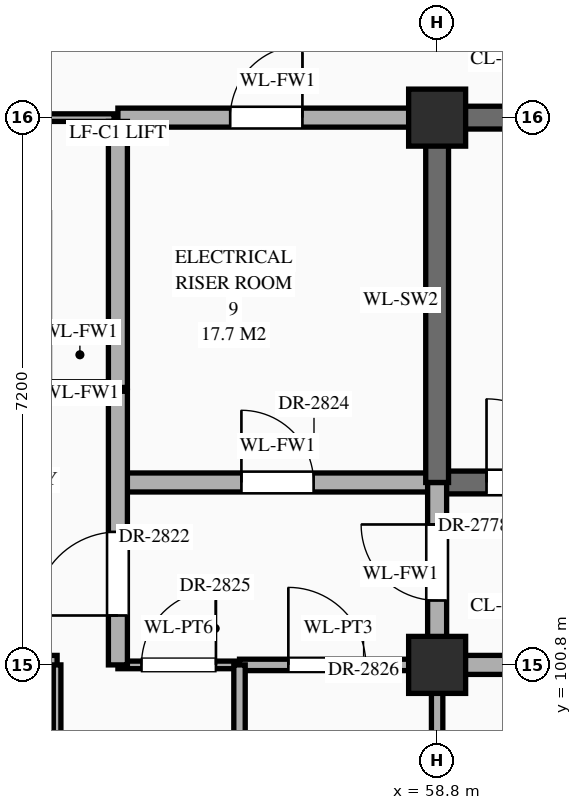
"""IFC4 building model, lengths in metres.
Left out: names, types, materials, properties, quantities, classifications, styles, units other than length and angle.
Written with IfcOpenShell. Run it as: python <this file> out.ifc"""

import sys

from ifc_helpers import new_model, si_unit, direction, frame, frame_2d, origin, origin_2d, place, context, subcontext, project, spatial, rectangle, extrude, element, fill, save


model = new_model("IFC4")
c1 = context("Model", 3, precision=1e-05, world=origin(), true_north=direction((0.0, 1.0)))
c2 = subcontext(c1, "Body", "Model", "MODEL_VIEW")
j1 = project(units=[si_unit("LENGTHUNIT", "METRE"), si_unit("PLANEANGLEUNIT", "RADIAN")], contexts=[c1])
p1 = place(None, origin())
s1 = spatial("IfcSite", under=j1, at=p1, CompositionType="ELEMENT")
p2 = place(p1, origin())
s2 = spatial("IfcBuilding", under=s1, at=p2, CompositionType="ELEMENT")
p3 = place(p2, frame((0.0, 0.0, 43.5)))
s3 = spatial("IfcBuildingStorey", under=s2, at=p3, CompositionType="ELEMENT", Elevation=43.5)
for number, where, z_axis, x_axis in (
    (1, (58.8, 100.8, 0.0), (0.0, 0.0, 1.0), (1.0, 0.0, 0.0)),
    (2, (58.8, 108.0, 0.0), (0.0, 0.0, 1.0), (1.0, 0.0, 0.0)),
):
    element("IfcColumn", number, at=place(p3, frame(where, z_axis=z_axis, x_axis=x_axis)), inside=s3, PredefinedType="COLUMN", context=c2, shape_type="SweptSolid", body=[
        extrude(rectangle(XDim=0.75, YDim=0.75, at=origin_2d()), origin(), (0.0, 0.0, 1.0), 4.2),
    ])
p4 = place(p3, frame((50.4, 100.8, 0.0), z_axis=(0.0, 0.0, 1.0), x_axis=(1.0, 0.0, 0.0)))
e3 = element("IfcWall", 3, at=p4, inside=s3, PredefinedType="STANDARD", context=c2, shape_type="SweptSolid", body=[
    extrude(rectangle(XDim=3.4, YDim=0.25, at=frame_2d((1.7, 0.0))), origin(), (0.0, 0.0, 1.0), 3.1),
])
p5 = place(p4, frame((1.347, 0.0, 0.0)))
e4 = element("IfcOpeningElement", 4, at=p5, cuts=e3, PredefinedType="OPENING", context=c2, shape_type="SweptSolid", body=[
    extrude(rectangle(XDim=1.0, YDim=2.2, at=frame_2d((0.5, 1.1))), frame((0.0, 0.137, 0.0), z_axis=(0.0, -1.0, 0.0), x_axis=(1.0, 0.0, 0.0)), (0.0, 0.0, 1.0), 0.274),
])
p6 = place(p3, frame((54.6, 100.8, 0.0), z_axis=(0.0, 0.0, 1.0), x_axis=(1.0, 0.0, 0.0)))
e5 = element("IfcWall", 5, at=p6, inside=s3, PredefinedType="STANDARD", context=c2, shape_type="SweptSolid", body=[
    extrude(rectangle(XDim=1.6, YDim=0.1, at=frame_2d((0.8, 0.0))), origin(), (0.0, 0.0, 1.0), 3.1),
])
p7 = place(p6, frame((0.31, 0.0, 0.0)))
e6 = element("IfcOpeningElement", 6, at=p7, cuts=e5, PredefinedType="OPENING", context=c2, shape_type="SweptSolid", body=[
    extrude(rectangle(XDim=0.98, YDim=2.35, at=frame_2d((0.49, 1.175))), frame((0.0, 0.062, 0.0), z_axis=(0.0, -1.0, 0.0), x_axis=(1.0, 0.0, 0.0)), (0.0, 0.0, 1.0), 0.124),
])
p8 = place(p3, frame((56.2, 100.8, 0.0), z_axis=(0.0, 0.0, 1.0), x_axis=(1.0, 0.0, 0.0)))
e7 = element("IfcWall", 7, at=p8, inside=s3, PredefinedType="STANDARD", context=c2, shape_type="SweptSolid", body=[
    extrude(rectangle(XDim=2.6, YDim=0.15, at=frame_2d((1.3, 0.0))), origin(), (0.0, 0.0, 1.0), 3.1),
])
p9 = place(p8, frame((0.643, 0.0, 0.0)))
e8 = element("IfcOpeningElement", 8, at=p9, cuts=e7, PredefinedType="OPENING", context=c2, shape_type="SweptSolid", body=[
    extrude(rectangle(XDim=1.02, YDim=2.4, at=frame_2d((0.51, 1.2))), frame((0.0, 0.087, 0.0), z_axis=(0.0, -1.0, 0.0), x_axis=(1.0, 0.0, 0.0)), (0.0, 0.0, 1.0), 0.174),
])
p10 = place(p3, frame((58.8, 100.8, 0.0), z_axis=(0.0, 0.0, 1.0), x_axis=(1.0, 0.0, 0.0)))
e9 = element("IfcWall", 9, at=p10, inside=s3, PredefinedType="STANDARD", context=c2, shape_type="SweptSolid", body=[
    extrude(rectangle(XDim=12.6, YDim=0.25, at=frame_2d((6.3, 0.0))), origin(), (0.0, 0.0, 1.0), 3.1),
])
p11 = place(p10, frame((3.725, 0.0, 0.0)))
e10 = element("IfcOpeningElement", 10, at=p11, cuts=e9, PredefinedType="OPENING", context=c2, shape_type="SweptSolid", body=[
    extrude(rectangle(XDim=0.95, YDim=2.15, at=frame_2d((0.475, 1.075))), frame((0.0, 0.137, 0.0), z_axis=(0.0, -1.0, 0.0), x_axis=(1.0, 0.0, 0.0)), (0.0, 0.0, 1.0), 0.274),
])
p12 = place(p3, frame((54.6, 103.2, 0.0), z_axis=(0.0, 0.0, 1.0), x_axis=(1.0, 0.0, 0.0)))
e11 = element("IfcWall", 11, at=p12, inside=s3, PredefinedType="STANDARD", context=c2, shape_type="SweptSolid", body=[
    extrude(rectangle(XDim=4.2, YDim=0.25, at=frame_2d((2.1, 0.0))), origin(), (0.0, 0.0, 1.0), 3.95),
])
p13 = place(p12, frame((1.625, 0.0, 0.0)))
e12 = element("IfcOpeningElement", 12, at=p13, cuts=e11, PredefinedType="OPENING", context=c2, shape_type="SweptSolid", body=[
    extrude(rectangle(XDim=0.95, YDim=2.15, at=frame_2d((0.475, 1.075))), frame((0.0, 0.137, 0.0), z_axis=(0.0, -1.0, 0.0), x_axis=(1.0, 0.0, 0.0)), (0.0, 0.0, 1.0), 0.274),
])
p14 = place(p3, frame((58.8, 103.2, 0.0), z_axis=(0.0, 0.0, 1.0), x_axis=(1.0, 0.0, 0.0)))
e13 = element("IfcWall", 13, at=p14, inside=s3, PredefinedType="SHEAR", context=c2, shape_type="SweptSolid", body=[
    extrude(rectangle(XDim=8.4, YDim=0.3, at=frame_2d((4.2, 0.0))), origin(), (0.0, 0.0, 1.0), 3.95),
])
p15 = place(p14, frame((0.65, 0.0, 0.0)))
e14 = element("IfcOpeningElement", 14, at=p15, cuts=e13, PredefinedType="OPENING", context=c2, shape_type="SweptSolid", body=[
    extrude(rectangle(XDim=1.1, YDim=2.2, at=frame_2d((0.55, 1.1))), frame((0.0, 0.162, 0.0), z_axis=(0.0, -1.0, 0.0), x_axis=(1.0, 0.0, 0.0)), (0.0, 0.0, 1.0), 0.324),
])
p16 = place(p3, frame((53.65, 104.4, 0.0), z_axis=(0.0, 0.0, 1.0), x_axis=(1.0, 0.0, 0.0)))
e15 = element("IfcWall", 15, at=p16, inside=s3, PredefinedType="STANDARD", context=c2, shape_type="SweptSolid", body=[
    extrude(rectangle(XDim=0.9, YDim=0.25, at=frame_2d((0.45, 0.0))), origin(), (0.0, 0.0, 1.0), 3.95),
])
p17 = place(p3, frame((50.45, 108.0, 0.0), z_axis=(0.0, 0.0, 1.0), x_axis=(1.0, 0.0, 0.0)))
e16 = element("IfcWall", 16, at=p17, inside=s3, PredefinedType="STANDARD", context=c2, shape_type="SweptSolid", body=[
    extrude(rectangle(XDim=4.1, YDim=0.1, at=frame_2d((2.05, 0.0))), origin(), (0.0, 0.0, 1.0), 3.1),
])
p18 = place(p3, frame((54.6, 108.0, 0.0), z_axis=(0.0, 0.0, 1.0), x_axis=(1.0, 0.0, 0.0)))
e17 = element("IfcWall", 17, at=p18, inside=s3, PredefinedType="STANDARD", context=c2, shape_type="SweptSolid", body=[
    extrude(rectangle(XDim=4.2, YDim=0.25, at=frame_2d((2.1, 0.0))), origin(), (0.0, 0.0, 1.0), 3.1),
])
p19 = place(p18, frame((1.478, 0.0, 0.0)))
e18 = element("IfcOpeningElement", 18, at=p19, cuts=e17, PredefinedType="OPENING", context=c2, shape_type="SweptSolid", body=[
    extrude(rectangle(XDim=0.95, YDim=2.15, at=frame_2d((0.475, 1.075))), frame((0.0, 0.137, 0.0), z_axis=(0.0, -1.0, 0.0), x_axis=(1.0, 0.0, 0.0)), (0.0, 0.0, 1.0), 0.274),
])
p20 = place(p3, frame((58.8, 108.0, 0.0), z_axis=(0.0, 0.0, 1.0), x_axis=(1.0, 0.0, 0.0)))
e19 = element("IfcWall", 19, at=p20, inside=s3, PredefinedType="SHEAR", context=c2, shape_type="SweptSolid", body=[
    extrude(rectangle(XDim=8.4, YDim=0.3, at=frame_2d((4.2, 0.0))), origin(), (0.0, 0.0, 1.0), 3.95),
])
p21 = place(p3, frame((53.8, 96.0, 0.0), z_axis=(0.0, 0.0, 1.0), x_axis=(0.0, 1.0, 0.0)))
e20 = element("IfcWall", 20, at=p21, inside=s3, PredefinedType="STANDARD", context=c2, shape_type="SweptSolid", body=[
    extrude(rectangle(XDim=4.8, YDim=0.1, at=frame_2d((2.4, 0.0))), origin(), (0.0, 0.0, 1.0), 3.95),
])
p22 = place(p21, frame((1.9, 0.0, 0.0)))
e21 = element("IfcOpeningElement", 21, at=p22, cuts=e20, PredefinedType="OPENING", context=c2, shape_type="SweptSolid", body=[
    extrude(rectangle(XDim=1.0, YDim=2.25, at=frame_2d((0.5, 1.125))), frame((0.0, 0.062, 0.0), z_axis=(0.0, -1.0, 0.0), x_axis=(1.0, 0.0, 0.0)), (0.0, 0.0, 1.0), 0.124),
])
p23 = place(p3, frame((54.6, 100.8, 0.0), z_axis=(0.0, 0.0, 1.0), x_axis=(0.0, 1.0, 0.0)))
e22 = element("IfcWall", 22, at=p23, inside=s3, PredefinedType="STANDARD", context=c2, shape_type="SweptSolid", body=[
    extrude(rectangle(XDim=3.6, YDim=0.25, at=frame_2d((1.8, 0.0))), origin(), (0.0, 0.0, 1.0), 3.65),
])
p24 = place(p23, frame((0.65, 0.0, 0.0)))
e23 = element("IfcOpeningElement", 23, at=p24, cuts=e22, PredefinedType="OPENING", context=c2, shape_type="SweptSolid", body=[
    extrude(rectangle(XDim=1.1, YDim=2.2, at=frame_2d((0.55, 1.1))), frame((0.0, 0.137, 0.0), z_axis=(0.0, -1.0, 0.0), x_axis=(1.0, 0.0, 0.0)), (0.0, 0.0, 1.0), 0.274),
])
p25 = place(p3, frame((54.6, 104.45, 0.0), z_axis=(0.0, 0.0, 1.0), x_axis=(0.0, 1.0, 0.0)))
e24 = element("IfcWall", 24, at=p25, inside=s3, PredefinedType="STANDARD", context=c2, shape_type="SweptSolid", body=[
    extrude(rectangle(XDim=3.5, YDim=0.25, at=frame_2d((1.75, 0.0))), origin(), (0.0, 0.0, 1.0), 3.65),
])
p26 = place(p3, frame((56.2, 96.0, 0.0), z_axis=(0.0, 0.0, 1.0), x_axis=(0.0, 1.0, 0.0)))
e25 = element("IfcWall", 25, at=p26, inside=s3, PredefinedType="STANDARD", context=c2, shape_type="SweptSolid", body=[
    extrude(rectangle(XDim=4.8, YDim=0.15, at=frame_2d((2.4, 0.0))), origin(), (0.0, 0.0, 1.0), 3.95),
])
p27 = place(p26, frame((1.88, 0.0, 0.0)))
e26 = element("IfcOpeningElement", 26, at=p27, cuts=e25, PredefinedType="OPENING", context=c2, shape_type="SweptSolid", body=[
    extrude(rectangle(XDim=1.04, YDim=2.2, at=frame_2d((0.52, 1.1))), frame((0.0, 0.087, 0.0), z_axis=(0.0, -1.0, 0.0), x_axis=(1.0, 0.0, 0.0)), (0.0, 0.0, 1.0), 0.174),
])
p28 = place(p3, frame((58.8, 96.0, 0.0), z_axis=(0.0, 0.0, 1.0), x_axis=(0.0, 1.0, 0.0)))
e27 = element("IfcWall", 27, at=p28, inside=s3, PredefinedType="STANDARD", context=c2, shape_type="SweptSolid", body=[
    extrude(rectangle(XDim=4.8, YDim=0.15, at=frame_2d((2.4, 0.0))), origin(), (0.0, 0.0, 1.0), 3.2),
])
p29 = place(p3, frame((58.8, 100.8, 0.0), z_axis=(0.0, 0.0, 1.0), x_axis=(0.0, 1.0, 0.0)))
e28 = element("IfcWall", 28, at=p29, inside=s3, PredefinedType="STANDARD", context=c2, shape_type="SweptSolid", body=[
    extrude(rectangle(XDim=2.4, YDim=0.25, at=frame_2d((1.2, 0.0))), origin(), (0.0, 0.0, 1.0), 3.2),
])
p30 = place(p29, frame((0.847, 0.0, 0.0)))
e29 = element("IfcOpeningElement", 29, at=p30, cuts=e28, PredefinedType="OPENING", context=c2, shape_type="SweptSolid", body=[
    extrude(rectangle(XDim=1.0, YDim=2.2, at=frame_2d((0.5, 1.1))), frame((0.0, 0.137, 0.0), z_axis=(0.0, -1.0, 0.0), x_axis=(1.0, 0.0, 0.0)), (0.0, 0.0, 1.0), 0.274),
])
p31 = place(p3, frame((58.8, 103.2, 0.0), z_axis=(0.0, 0.0, 1.0), x_axis=(0.0, 1.0, 0.0)))
e30 = element("IfcWall", 30, at=p31, inside=s3, PredefinedType="SHEAR", context=c2, shape_type="SweptSolid", body=[
    extrude(rectangle(XDim=4.8, YDim=0.3, at=frame_2d((2.4, 0.0))), origin(), (0.0, 0.0, 1.0), 3.95),
])
p32 = place(p15, origin())
e31 = element("IfcDoor", 31, at=p32, inside=s3, OperationType="SINGLE_SWING_LEFT", PredefinedType="DOOR", context=c2, shape_type="SweptSolid", body=[
    extrude(rectangle(XDim=1.1, YDim=2.2, at=frame_2d((0.55, 1.1))), frame((0.0, 0.025, 0.0), z_axis=(0.0, -1.0, 0.0), x_axis=(1.0, 0.0, 0.0)), (0.0, 0.0, 1.0), 0.05),
])
fill(e14, e31)
p33 = place(p30, origin())
e32 = element("IfcDoor", 32, at=p33, inside=s3, OperationType="SINGLE_SWING_RIGHT", PredefinedType="DOOR", context=c2, shape_type="SweptSolid", body=[
    extrude(rectangle(XDim=1.0, YDim=2.2, at=frame_2d((0.5, 1.1))), frame((0.0, 0.025, 0.0), z_axis=(0.0, -1.0, 0.0), x_axis=(1.0, 0.0, 0.0)), (0.0, 0.0, 1.0), 0.05),
])
fill(e29, e32)
p34 = place(p24, origin())
e33 = element("IfcDoor", 33, at=p34, inside=s3, OperationType="SINGLE_SWING_LEFT", PredefinedType="DOOR", context=c2, shape_type="SweptSolid", body=[
    extrude(rectangle(XDim=1.1, YDim=2.2, at=frame_2d((0.55, 1.1))), frame((0.0, 0.025, 0.0), z_axis=(0.0, -1.0, 0.0), x_axis=(1.0, 0.0, 0.0)), (0.0, 0.0, 1.0), 0.05),
])
fill(e23, e33)
p35 = place(p13, origin())
e34 = element("IfcDoor", 34, at=p35, inside=s3, OperationType="SINGLE_SWING_LEFT", PredefinedType="DOOR", context=c2, shape_type="SweptSolid", body=[
    extrude(rectangle(XDim=0.95, YDim=2.15, at=frame_2d((0.475, 1.075))), frame((0.0, 0.025, 0.0), z_axis=(0.0, -1.0, 0.0), x_axis=(1.0, 0.0, 0.0)), (0.0, 0.0, 1.0), 0.05),
])
fill(e12, e34)
p36 = place(p7, origin())
e35 = element("IfcDoor", 35, at=p36, inside=s3, OperationType="SINGLE_SWING_RIGHT", PredefinedType="DOOR", context=c2, shape_type="SweptSolid", body=[
    extrude(rectangle(XDim=0.98, YDim=2.35, at=frame_2d((0.49, 1.175))), frame((0.0, 0.025, 0.0), z_axis=(0.0, -1.0, 0.0), x_axis=(1.0, 0.0, 0.0)), (0.0, 0.0, 1.0), 0.05),
])
fill(e6, e35)
p37 = place(p9, origin())
e36 = element("IfcDoor", 36, at=p37, inside=s3, OperationType="SINGLE_SWING_LEFT", PredefinedType="DOOR", context=c2, shape_type="SweptSolid", body=[
    extrude(rectangle(XDim=1.02, YDim=2.4, at=frame_2d((0.51, 1.2))), frame((0.0, 0.025, 0.0), z_axis=(0.0, -1.0, 0.0), x_axis=(1.0, 0.0, 0.0)), (0.0, 0.0, 1.0), 0.05),
])
fill(e8, e36)
p38 = place(p19, origin())
e37 = element("IfcDoor", 37, at=p38, inside=s3, OperationType="SINGLE_SWING_RIGHT", PredefinedType="DOOR", context=c2, shape_type="SweptSolid", body=[
    extrude(rectangle(XDim=0.95, YDim=2.15, at=frame_2d((0.475, 1.075))), frame((0.0, 0.025, 0.0), z_axis=(0.0, -1.0, 0.0), x_axis=(1.0, 0.0, 0.0)), (0.0, 0.0, 1.0), 0.05),
])
fill(e18, e37)
save(model, sys.argv[1])
